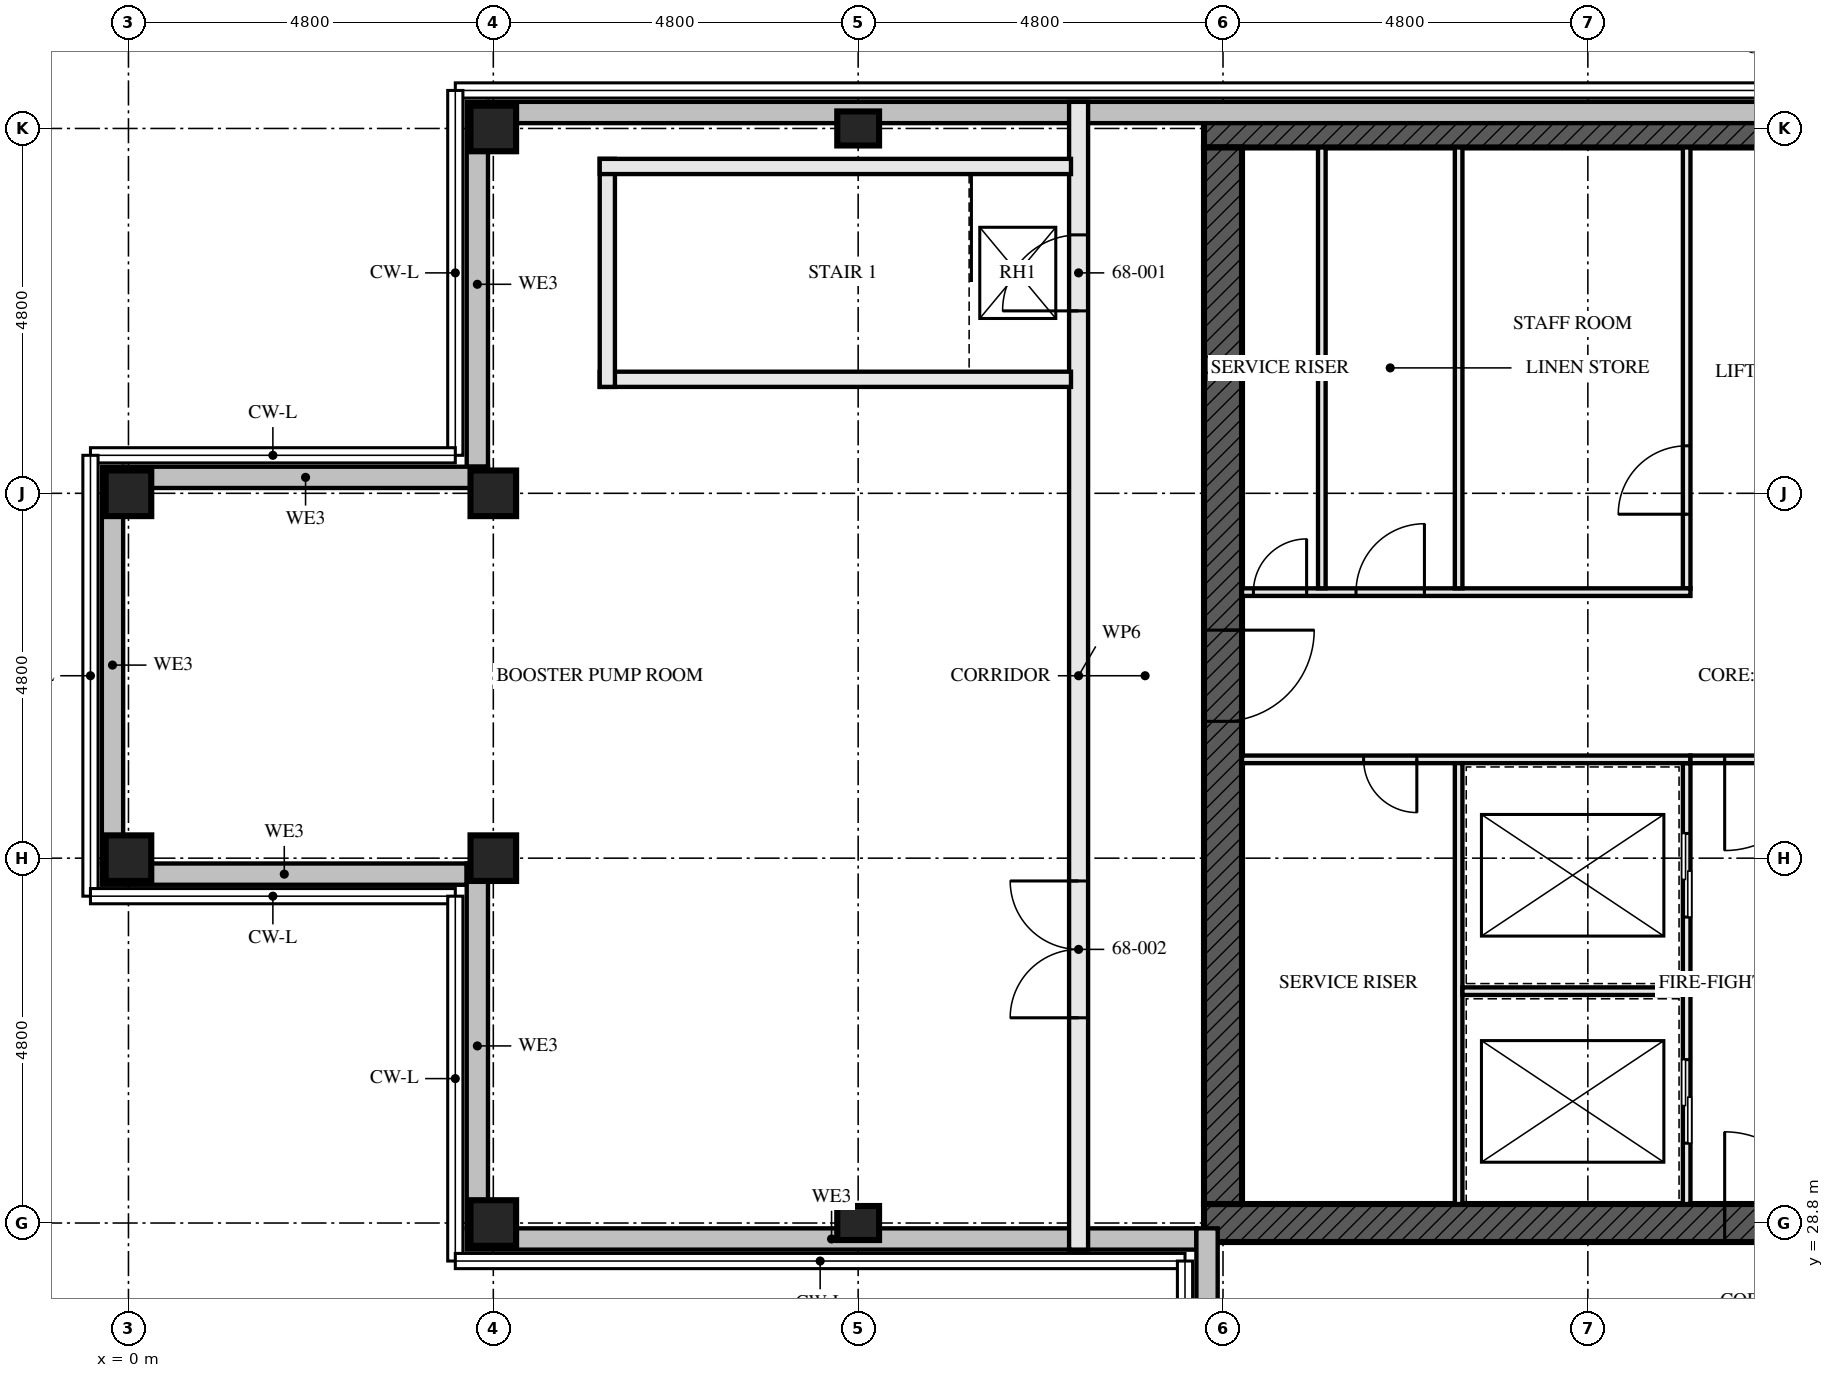
"""IFC4 building model, lengths in metres.
Left out: names, types, materials, properties, quantities, classifications, styles, units other than length and angle.
Written with IfcOpenShell. Run it as: python <this file> out.ifc"""

import sys

from ifc_helpers import new_model, si_unit, direction, frame, frame_2d, origin, origin_2d, place, context, subcontext, project, spatial, rectangle, hollow_rectangle, i_section, extrude, element, fill, save


model = new_model("IFC4")
c1 = context("Model", 3, precision=1e-05, world=origin(), true_north=direction((0.0, 1.0)))
c2 = subcontext(c1, "Body", "Model", "MODEL_VIEW")
j1 = project(units=[si_unit("LENGTHUNIT", "METRE"), si_unit("PLANEANGLEUNIT", "RADIAN")], contexts=[c1])
p1 = place(None, origin())
s1 = spatial("IfcSite", under=j1, at=p1, CompositionType="ELEMENT")
p2 = place(p1, origin())
s2 = spatial("IfcBuilding", under=s1, at=p2, CompositionType="ELEMENT")
p3 = place(p2, frame((0.0, 0.0, 248.0)))
s3 = spatial("IfcBuildingStorey", under=s2, at=p3, CompositionType="ELEMENT", Elevation=248.0)
for number, where, z_axis, x_axis in (
    (1, (0.0, 33.6, 0.0), (0.0, 0.0, 1.0), (0.0, 1.0, 0.0)),
    (2, (0.0, 38.4, 0.0), (0.0, 0.0, 1.0), (0.0, 1.0, 0.0)),
    (3, (4.8, 28.8, 0.0), (0.0, 0.0, 1.0), (0.0, 1.0, 0.0)),
    (4, (4.8, 33.6, 0.0), (0.0, 0.0, 1.0), (0.0, 1.0, 0.0)),
    (5, (4.8, 38.4, 0.0), (0.0, 0.0, 1.0), (0.0, 1.0, 0.0)),
    (6, (4.8, 43.2, 0.0), (0.0, 0.0, 1.0), (0.0, 1.0, 0.0)),
):
    element("IfcColumn", number, at=place(p3, frame(where, z_axis=z_axis, x_axis=x_axis)), inside=s3, PredefinedType="COLUMN", context=c2, shape_type="SweptSolid", body=[
        extrude(hollow_rectangle(XDim=0.6, YDim=0.6, WallThickness=0.05, at=origin_2d()), origin(), (0.0, 0.0, 1.0), 4.25),
    ])
for number, where, z_axis, x_axis in (
    (7, (9.6, 28.8, 0.0), (0.0, 0.0, 1.0), (0.0, 1.0, 0.0)),
    (8, (9.6, 43.2, 0.0), (0.0, 0.0, 1.0), (0.0, 1.0, 0.0)),
):
    element("IfcColumn", number, at=place(p3, frame(where, z_axis=z_axis, x_axis=x_axis)), inside=s3, PredefinedType="COLUMN", context=c2, shape_type="SweptSolid", body=[
        extrude(i_section(OverallWidth=0.448, OverallDepth=0.55, WebThickness=0.072, FlangeThickness=0.115, FilletRadius=0.015, at=origin_2d()), origin(), (0.0, 0.0, 1.0), 4.25),
    ])
p4 = place(p3, frame((14.15, 28.8, -0.25), z_axis=(0.0, 0.0, 1.0), x_axis=(1.0, 0.0, 0.0)))
e9 = element("IfcWall", 9, at=p4, inside=s3, PredefinedType="SHEAR", context=c2, shape_type="SweptSolid", body=[
    extrude(rectangle(XDim=14.9, YDim=0.5, at=frame_2d((7.45, 0.0))), origin(), (0.0, 0.0, 1.0), 4.5),
])
p5 = place(p4, frame((6.85, 0.0, 0.25)))
e10 = element("IfcOpeningElement", 10, at=p5, cuts=e9, PredefinedType="OPENING", context=c2, shape_type="SweptSolid", body=[
    extrude(rectangle(XDim=1.2, YDim=2.1, at=frame_2d((0.6, 1.05))), frame((0.0, 0.26, 0.0), z_axis=(0.0, -1.0, 0.0), x_axis=(1.0, 0.0, 0.0)), (0.0, 0.0, 1.0), 0.521),
])
p6 = place(p3, frame((29.05, 43.2, -0.25), z_axis=(0.0, 0.0, 1.0), x_axis=(-1.0, 0.0, 0.0)))
e11 = element("IfcWall", 11, at=p6, inside=s3, PredefinedType="SHEAR", context=c2, shape_type="SweptSolid", body=[
    extrude(rectangle(XDim=14.9, YDim=0.5, at=frame_2d((7.45, 0.0))), origin(), (0.0, 0.0, 1.0), 4.5),
])
p7 = place(p3, frame((14.4, 42.95, -0.25), z_axis=(0.0, 0.0, 1.0), x_axis=(0.0, -1.0, 0.0)))
e12 = element("IfcWall", 12, at=p7, inside=s3, PredefinedType="SHEAR", context=c2, shape_type="SweptSolid", body=[
    extrude(rectangle(XDim=13.9, YDim=0.5, at=frame_2d((6.95, 0.0))), origin(), (0.0, 0.0, 1.0), 4.5),
])
p8 = place(p7, frame((6.35, 0.0, 0.25)))
e13 = element("IfcOpeningElement", 13, at=p8, cuts=e12, PredefinedType="OPENING", context=c2, shape_type="SweptSolid", body=[
    extrude(rectangle(XDim=1.2, YDim=2.1, at=frame_2d((0.6, 1.05))), frame((0.0, 0.26, 0.0), z_axis=(0.0, -1.0, 0.0), x_axis=(1.0, 0.0, 0.0)), (0.0, 0.0, 1.0), 0.521),
])
p9 = place(p3, frame((38.75, 43.41, 4.5), z_axis=(0.0, 0.0, 1.0), x_axis=(-1.0, 0.0, 0.0)))
e14 = element("IfcWall", 14, at=p9, inside=s3, PredefinedType="PARAPET", context=c2, shape_type="SweptSolid", body=[
    extrude(rectangle(XDim=34.02, YDim=0.28, at=frame_2d((17.01, 0.0))), origin(), (0.0, 0.0, 1.0), 1.1),
])
for number, where, z_axis, x_axis in (
    (15, (4.59, 43.55, 4.5), (0.0, 0.0, 1.0), (0.0, -1.0, 0.0)),
    (16, (4.73, 38.61, 4.5), (0.0, 0.0, 1.0), (-1.0, 0.0, 0.0)),
):
    element("IfcWall", number, at=place(p3, frame(where, z_axis=z_axis, x_axis=x_axis)), inside=s3, PredefinedType="PARAPET", context=c2, shape_type="SweptSolid", body=[
        extrude(rectangle(XDim=4.8, YDim=0.28, at=frame_2d((2.4, 0.0))), origin(), (0.0, 0.0, 1.0), 1.1),
    ])
p10 = place(p3, frame((-0.21, 38.75, 4.5), z_axis=(0.0, 0.0, 1.0), x_axis=(0.0, -1.0, 0.0)))
e17 = element("IfcWall", 17, at=p10, inside=s3, PredefinedType="PARAPET", context=c2, shape_type="SweptSolid", body=[
    extrude(rectangle(XDim=5.22, YDim=0.28, at=frame_2d((2.61, 0.0))), origin(), (0.0, 0.0, 1.0), 1.1),
])
for number, where, z_axis, x_axis in (
    (18, (-0.35, 33.39, 4.5), (0.0, 0.0, 1.0), (1.0, 0.0, 0.0)),
    (19, (4.59, 33.53, 4.5), (0.0, 0.0, 1.0), (0.0, -1.0, 0.0)),
):
    element("IfcWall", number, at=place(p3, frame(where, z_axis=z_axis, x_axis=x_axis)), inside=s3, PredefinedType="PARAPET", context=c2, shape_type="SweptSolid", body=[
        extrude(rectangle(XDim=4.8, YDim=0.28, at=frame_2d((2.4, 0.0))), origin(), (0.0, 0.0, 1.0), 1.1),
    ])
for number, where, z_axis, x_axis in (
    (20, (4.45, 28.59, 4.5), (0.0, 0.0, 1.0), (1.0, 0.0, 0.0)),
    (21, (14.19, 28.73, 4.5), (0.0, 0.0, 1.0), (0.0, -1.0, 0.0)),
):
    element("IfcWall", number, at=place(p3, frame(where, z_axis=z_axis, x_axis=x_axis)), inside=s3, PredefinedType="PARAPET", context=c2, shape_type="SweptSolid", body=[
        extrude(rectangle(XDim=9.6, YDim=0.28, at=frame_2d((4.8, 0.0))), origin(), (0.0, 0.0, 1.0), 1.1),
    ])
for number, where, z_axis, x_axis in (
    (22, (6.2, 42.7, 0.0), (0.0, 0.0, 1.0), (1.0, 0.0, 0.0)),
    (23, (6.2, 39.9, 0.0), (0.0, 0.0, 1.0), (1.0, 0.0, 0.0)),
):
    element("IfcWall", number, at=place(p3, frame(where, z_axis=z_axis, x_axis=x_axis)), inside=s3, PredefinedType="SOLIDWALL", context=c2, shape_type="SweptSolid", body=[
        extrude(rectangle(XDim=6.2, YDim=0.2, at=frame_2d((3.1, 0.0))), origin(), (0.0, 0.0, 1.0), 4.25),
    ])
p11 = place(p3, frame((6.3, 42.8, 0.0), z_axis=(0.0, 0.0, 1.0), x_axis=(0.0, -1.0, 0.0)))
e24 = element("IfcWall", 24, at=p11, inside=s3, PredefinedType="SOLIDWALL", context=c2, shape_type="SweptSolid", body=[
    extrude(rectangle(XDim=3.0, YDim=0.2, at=frame_2d((1.5, 0.0))), origin(), (0.0, 0.0, 1.0), 4.25),
])
p12 = place(p3, frame((12.5, 43.55, 0.0), z_axis=(0.0, 0.0, 1.0), x_axis=(0.0, -1.0, 0.0)))
e25 = element("IfcWall", 25, at=p12, inside=s3, PredefinedType="SOLIDWALL", context=c2, shape_type="SweptSolid", body=[
    extrude(rectangle(XDim=15.1, YDim=0.25, at=frame_2d((7.55, 0.0))), origin(), (0.0, 0.0, 1.0), 3.34),
])
p13 = place(p12, frame((1.75, 0.0, 0.0)))
e26 = element("IfcOpeningElement", 26, at=p13, cuts=e25, PredefinedType="OPENING", context=c2, shape_type="SweptSolid", body=[
    extrude(rectangle(XDim=1.0, YDim=2.1, at=frame_2d((0.5, 1.05))), frame((0.0, 0.135, 0.0), z_axis=(0.0, -1.0, 0.0), x_axis=(1.0, 0.0, 0.0)), (0.0, 0.0, 1.0), 0.271),
])
p14 = place(p12, frame((10.25, 0.0, 0.0)))
e27 = element("IfcOpeningElement", 27, at=p14, cuts=e25, PredefinedType="OPENING", context=c2, shape_type="SweptSolid", body=[
    extrude(rectangle(XDim=1.8, YDim=2.4, at=frame_2d((0.9, 1.2))), frame((0.0, 0.135, 0.0), z_axis=(0.0, -1.0, 0.0), x_axis=(1.0, 0.0, 0.0)), (0.0, 0.0, 1.0), 0.271),
])
p15 = place(p3, frame((15.7, 37.15, 0.0), z_axis=(0.0, 0.0, 1.0), x_axis=(0.0, 1.0, 0.0)))
e28 = element("IfcWall", 28, at=p15, inside=s3, PredefinedType="SOLIDWALL", context=c2, shape_type="SweptSolid", body=[
    extrude(rectangle(XDim=5.8, YDim=0.1, at=frame_2d((2.9, 0.0))), origin(), (0.0, 0.0, 1.0), 4.25),
])
p16 = place(p3, frame((20.5, 29.05, 0.0), z_axis=(0.0, 0.0, 1.0), x_axis=(0.0, 1.0, 0.0)))
e29 = element("IfcWall", 29, at=p16, inside=s3, PredefinedType="SOLIDWALL", context=c2, shape_type="SweptSolid", body=[
    extrude(rectangle(XDim=5.8, YDim=0.1, at=frame_2d((2.9, 0.0))), origin(), (0.0, 0.0, 1.0), 4.25),
])
p17 = place(p16, frame((0.8, 0.0, 0.0)))
e30 = element("IfcOpeningElement", 30, at=p17, cuts=e29, PredefinedType="OPENING", context=c2, shape_type="SweptSolid", body=[
    extrude(rectangle(XDim=1.1, YDim=2.3, at=frame_2d((0.55, 1.15))), frame((0.0, 0.061, 0.0), z_axis=(0.0, -1.0, 0.0), x_axis=(1.0, 0.0, 0.0)), (0.0, 0.0, 1.0), 0.121),
])
p18 = place(p16, frame((3.775, 0.0, 0.0)))
e31 = element("IfcOpeningElement", 31, at=p18, cuts=e29, PredefinedType="OPENING", context=c2, shape_type="SweptSolid", body=[
    extrude(rectangle(XDim=1.1, YDim=2.3, at=frame_2d((0.55, 1.15))), frame((0.0, 0.061, 0.0), z_axis=(0.0, -1.0, 0.0), x_axis=(1.0, 0.0, 0.0)), (0.0, 0.0, 1.0), 0.121),
])
p19 = place(p3, frame((20.5, 37.15, 0.0), z_axis=(0.0, 0.0, 1.0), x_axis=(0.0, 1.0, 0.0)))
e32 = element("IfcWall", 32, at=p19, inside=s3, PredefinedType="SOLIDWALL", context=c2, shape_type="SweptSolid", body=[
    extrude(rectangle(XDim=5.8, YDim=0.1, at=frame_2d((2.9, 0.0))), origin(), (0.0, 0.0, 1.0), 4.25),
])
p20 = place(p19, frame((0.975, 0.0, 0.0)))
e33 = element("IfcOpeningElement", 33, at=p20, cuts=e32, PredefinedType="OPENING", context=c2, shape_type="SweptSolid", body=[
    extrude(rectangle(XDim=0.9, YDim=2.1, at=frame_2d((0.45, 1.05))), frame((0.0, 0.061, 0.0), z_axis=(0.0, -1.0, 0.0), x_axis=(1.0, 0.0, 0.0)), (0.0, 0.0, 1.0), 0.121),
])
p21 = place(p3, frame((14.65, 34.9, 0.0), z_axis=(0.0, 0.0, 1.0), x_axis=(1.0, 0.0, 0.0)))
e34 = element("IfcWall", 34, at=p21, inside=s3, PredefinedType="SOLIDWALL", context=c2, shape_type="SweptSolid", body=[
    extrude(rectangle(XDim=5.9, YDim=0.1, at=frame_2d((2.95, 0.0))), origin(), (0.0, 0.0, 1.0), 4.25),
])
p22 = place(p21, frame((1.6, 0.0, 0.0)))
e35 = element("IfcOpeningElement", 35, at=p22, cuts=e34, PredefinedType="OPENING", context=c2, shape_type="SweptSolid", body=[
    extrude(rectangle(XDim=0.7, YDim=2.1, at=frame_2d((0.35, 1.05))), frame((0.0, 0.061, 0.0), z_axis=(0.0, -1.0, 0.0), x_axis=(1.0, 0.0, 0.0)), (0.0, 0.0, 1.0), 0.121),
])
p23 = place(p3, frame((14.65, 37.1, 0.0), z_axis=(0.0, 0.0, 1.0), x_axis=(1.0, 0.0, 0.0)))
e36 = element("IfcWall", 36, at=p23, inside=s3, PredefinedType="SOLIDWALL", context=c2, shape_type="SweptSolid", body=[
    extrude(rectangle(XDim=5.9, YDim=0.1, at=frame_2d((2.95, 0.0))), origin(), (0.0, 0.0, 1.0), 4.25),
])
p24 = place(p23, frame((0.15, 0.0, 0.0)))
e37 = element("IfcOpeningElement", 37, at=p24, cuts=e36, PredefinedType="OPENING", context=c2, shape_type="SweptSolid", body=[
    extrude(rectangle(XDim=0.7, YDim=2.1, at=frame_2d((0.35, 1.05))), frame((0.0, 0.061, 0.0), z_axis=(0.0, -1.0, 0.0), x_axis=(1.0, 0.0, 0.0)), (0.0, 0.0, 1.0), 0.121),
])
p25 = place(p23, frame((1.5, 0.0, 0.0)))
e38 = element("IfcOpeningElement", 38, at=p25, cuts=e36, PredefinedType="OPENING", context=c2, shape_type="SweptSolid", body=[
    extrude(rectangle(XDim=0.9, YDim=2.1, at=frame_2d((0.45, 1.05))), frame((0.0, 0.061, 0.0), z_axis=(0.0, -1.0, 0.0), x_axis=(1.0, 0.0, 0.0)), (0.0, 0.0, 1.0), 0.121),
])
p26 = place(p3, frame((20.55, 34.9, 0.0), z_axis=(0.0, 0.0, 1.0), x_axis=(1.0, 0.0, 0.0)))
e39 = element("IfcWall", 39, at=p26, inside=s3, PredefinedType="SOLIDWALL", context=c2, shape_type="SweptSolid", body=[
    extrude(rectangle(XDim=2.5, YDim=0.1, at=frame_2d((1.25, 0.0))), origin(), (0.0, 0.0, 1.0), 3.04),
])
p27 = place(p26, frame((0.45, 0.0, 0.0)))
e40 = element("IfcOpeningElement", 40, at=p27, cuts=e39, PredefinedType="OPENING", context=c2, shape_type="SweptSolid", body=[
    extrude(rectangle(XDim=1.2, YDim=2.1, at=frame_2d((0.6, 1.05))), frame((0.0, 0.061, 0.0), z_axis=(0.0, -1.0, 0.0), x_axis=(1.0, 0.0, 0.0)), (0.0, 0.0, 1.0), 0.121),
])
p28 = place(p3, frame((17.5, 29.05, 0.0), z_axis=(0.0, 0.0, 1.0), x_axis=(0.0, 1.0, 0.0)))
e41 = element("IfcWall", 41, at=p28, inside=s3, PredefinedType="SOLIDWALL", context=c2, shape_type="SweptSolid", body=[
    extrude(rectangle(XDim=5.8, YDim=0.1, at=frame_2d((2.9, 0.0))), origin(), (0.0, 0.0, 1.0), 4.25),
])
p29 = place(p3, frame((17.55, 31.85, 0.0), z_axis=(0.0, 0.0, 1.0), x_axis=(1.0, 0.0, 0.0)))
e42 = element("IfcWall", 42, at=p29, inside=s3, PredefinedType="SOLIDWALL", context=c2, shape_type="SweptSolid", body=[
    extrude(rectangle(XDim=2.9, YDim=0.1, at=frame_2d((1.45, 0.0))), origin(), (0.0, 0.0, 1.0), 4.25),
])
p30 = place(p3, frame((17.5, 37.15, 0.0), z_axis=(0.0, 0.0, 1.0), x_axis=(0.0, 1.0, 0.0)))
e43 = element("IfcWall", 43, at=p30, inside=s3, PredefinedType="SOLIDWALL", context=c2, shape_type="SweptSolid", body=[
    extrude(rectangle(XDim=5.8, YDim=0.1, at=frame_2d((2.9, 0.0))), origin(), (0.0, 0.0, 1.0), 4.25),
])
p31 = place(p2, frame((0.0, 0.0, 252.5)))
p32 = place(p31, frame((0.0, 0.0, -0.25)))
p33 = place(p32, frame((11.7, 41.3, 0.0)))
p34 = place(p33, frame((0.0, 0.0, 0.2)))
e44 = element("IfcWindow", 44, at=p34, inside=s3, PartitioningType="SINGLE_PANEL", PredefinedType="SKYLIGHT", context=c2, shape_type="SweptSolid", body=[
    extrude(rectangle(XDim=1.0, YDim=1.2, at=origin_2d()), origin(), (0.0, 0.0, 1.0), 0.05),
])
p35 = place(p13, frame((1.0, 0.0, 0.0), z_axis=(0.0, 0.0, 1.0), x_axis=(-1.0, 0.0, 0.0)))
e45 = element("IfcDoor", 45, at=p35, inside=s3, OperationType="SINGLE_SWING_RIGHT", PredefinedType="DOOR", context=c2, shape_type="SweptSolid", body=[
    extrude(rectangle(XDim=1.0, YDim=2.1, at=frame_2d((0.5, 1.05))), frame((0.0, 0.032, 0.0), z_axis=(0.0, -1.0, 0.0), x_axis=(1.0, 0.0, 0.0)), (0.0, 0.0, 1.0), 0.064),
])
fill(e26, e45)
p36 = place(p14, frame((1.8, 0.0, 0.0), z_axis=(0.0, 0.0, 1.0), x_axis=(-1.0, 0.0, 0.0)))
e46 = element("IfcDoor", 46, at=p36, inside=s3, OperationType="DOUBLE_DOOR_SINGLE_SWING", PredefinedType="DOOR", context=c2, shape_type="SweptSolid", body=[
    extrude(rectangle(XDim=1.8, YDim=2.4, at=frame_2d((0.9, 1.2))), frame((0.0, 0.032, 0.0), z_axis=(0.0, -1.0, 0.0), x_axis=(1.0, 0.0, 0.0)), (0.0, 0.0, 1.0), 0.064),
])
fill(e27, e46)
p37 = place(p17, origin())
e47 = element("IfcDoor", 47, at=p37, inside=s3, OperationType="SLIDING_TO_LEFT", PredefinedType="DOOR", context=c2, shape_type="SweptSolid", body=[
    extrude(rectangle(XDim=1.1, YDim=2.3, at=frame_2d((0.55, 1.15))), frame((0.0, 0.05, 0.0), z_axis=(0.0, -1.0, 0.0), x_axis=(1.0, 0.0, 0.0)), (0.0, 0.0, 1.0), 0.1),
])
fill(e30, e47)
p38 = place(p18, origin())
e48 = element("IfcDoor", 48, at=p38, inside=s3, OperationType="SLIDING_TO_LEFT", PredefinedType="DOOR", context=c2, shape_type="SweptSolid", body=[
    extrude(rectangle(XDim=1.1, YDim=2.3, at=frame_2d((0.55, 1.15))), frame((0.0, 0.05, 0.0), z_axis=(0.0, -1.0, 0.0), x_axis=(1.0, 0.0, 0.0)), (0.0, 0.0, 1.0), 0.1),
])
fill(e31, e48)
p39 = place(p20, origin())
e49 = element("IfcDoor", 49, at=p39, inside=s3, OperationType="SINGLE_SWING_RIGHT", PredefinedType="DOOR", context=c2, shape_type="SweptSolid", body=[
    extrude(rectangle(XDim=0.9, YDim=2.1, at=frame_2d((0.45, 1.05))), frame((0.0, 0.027, 0.0), z_axis=(0.0, -1.0, 0.0), x_axis=(1.0, 0.0, 0.0)), (0.0, 0.0, 1.0), 0.054),
])
fill(e33, e49)
p40 = place(p22, frame((0.7, 0.0, 0.0), z_axis=(0.0, 0.0, 1.0), x_axis=(-1.0, 0.0, 0.0)))
e50 = element("IfcDoor", 50, at=p40, inside=s3, OperationType="SINGLE_SWING_RIGHT", PredefinedType="DOOR", context=c2, shape_type="SweptSolid", body=[
    extrude(rectangle(XDim=0.7, YDim=2.1, at=frame_2d((0.35, 1.05))), frame((0.0, 0.027, 0.0), z_axis=(0.0, -1.0, 0.0), x_axis=(1.0, 0.0, 0.0)), (0.0, 0.0, 1.0), 0.054),
])
fill(e35, e50)
p41 = place(p24, origin())
e51 = element("IfcDoor", 51, at=p41, inside=s3, OperationType="SINGLE_SWING_LEFT", PredefinedType="DOOR", context=c2, shape_type="SweptSolid", body=[
    extrude(rectangle(XDim=0.7, YDim=2.1, at=frame_2d((0.35, 1.05))), frame((0.0, 0.027, 0.0), z_axis=(0.0, -1.0, 0.0), x_axis=(1.0, 0.0, 0.0)), (0.0, 0.0, 1.0), 0.054),
])
fill(e37, e51)
p42 = place(p25, origin())
e52 = element("IfcDoor", 52, at=p42, inside=s3, OperationType="SINGLE_SWING_LEFT", PredefinedType="DOOR", context=c2, shape_type="SweptSolid", body=[
    extrude(rectangle(XDim=0.9, YDim=2.1, at=frame_2d((0.45, 1.05))), frame((0.0, 0.027, 0.0), z_axis=(0.0, -1.0, 0.0), x_axis=(1.0, 0.0, 0.0)), (0.0, 0.0, 1.0), 0.054),
])
fill(e38, e52)
p43 = place(p27, frame((1.2, 0.0, 0.0), z_axis=(0.0, 0.0, 1.0), x_axis=(-1.0, 0.0, 0.0)))
e53 = element("IfcDoor", 53, at=p43, inside=s3, OperationType="SINGLE_SWING_LEFT", PredefinedType="DOOR", context=c2, shape_type="SweptSolid", body=[
    extrude(rectangle(XDim=1.2, YDim=2.1, at=frame_2d((0.6, 1.05))), frame((0.0, 0.027, 0.0), z_axis=(0.0, -1.0, 0.0), x_axis=(1.0, 0.0, 0.0)), (0.0, 0.0, 1.0), 0.054),
])
fill(e40, e53)
p44 = place(p5, origin())
e54 = element("IfcDoor", 54, at=p44, inside=s3, OperationType="SINGLE_SWING_LEFT", PredefinedType="DOOR", context=c2, shape_type="SweptSolid", body=[
    extrude(rectangle(XDim=1.2, YDim=2.1, at=frame_2d((0.6, 1.05))), frame((0.0, 0.027, 0.0), z_axis=(0.0, -1.0, 0.0), x_axis=(1.0, 0.0, 0.0)), (0.0, 0.0, 1.0), 0.054),
])
fill(e10, e54)
p45 = place(p8, origin())
e55 = element("IfcDoor", 55, at=p45, inside=s3, OperationType="SINGLE_SWING_LEFT", PredefinedType="DOOR", context=c2, shape_type="SweptSolid", body=[
    extrude(rectangle(XDim=1.2, YDim=2.1, at=frame_2d((0.6, 1.05))), frame((0.0, 0.027, 0.0), z_axis=(0.0, -1.0, 0.0), x_axis=(1.0, 0.0, 0.0)), (0.0, 0.0, 1.0), 0.054),
])
fill(e13, e55)
save(model, sys.argv[1])
